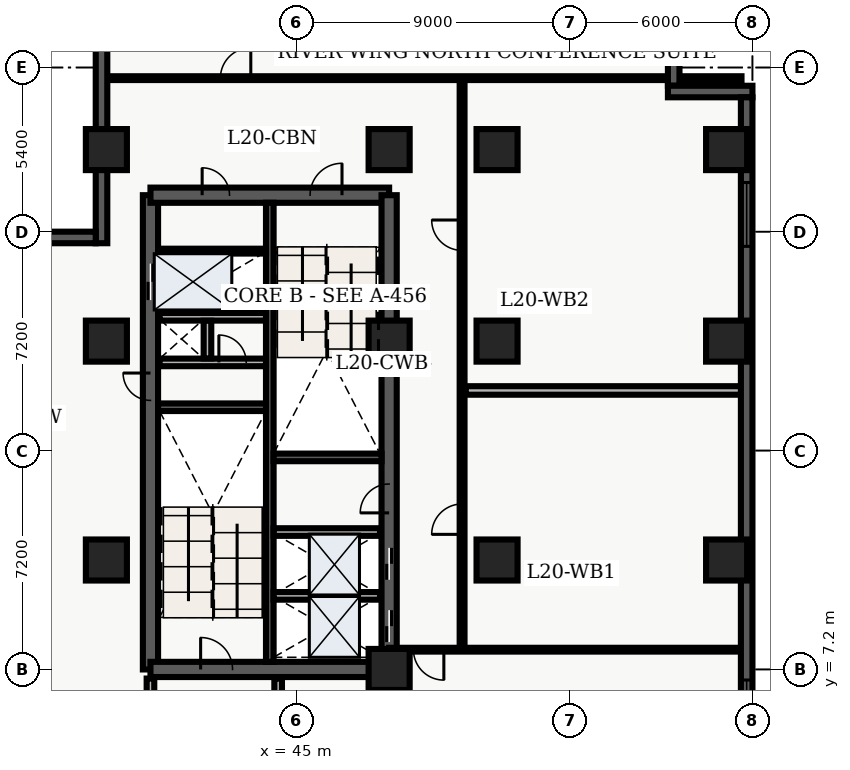
"""IFC4 building model, lengths in metres.
Left out: names, types, materials, properties, quantities, classifications, styles, units other than length and angle.
Written with IfcOpenShell. Run it as: python <this file> out.ifc"""

import sys

from ifc_helpers import new_model, entity, si_unit, converted_unit, direction, frame, origin_with_axes, origin_2d_with_axis, place, context, subcontext, project, spatial, polyline, rectangle, outline, extrude, element, fill, save


model = new_model("IFC4")
c1 = context("Model", 3, precision=1e-05, world=origin_with_axes(), true_north=direction((0.0, 1.0)))
c2 = subcontext(c1, "Body", "Model", "MODEL_VIEW")
j1 = project(units=[si_unit("LENGTHUNIT", "METRE"), converted_unit("PLANEANGLEUNIT", "DEGREE", entity("IfcPlaneAngleMeasure", 0.017), si_unit("PLANEANGLEUNIT", "RADIAN"), dimensions=[0, 0, 0, 0, 0, 0, 0])], contexts=[c1])
p1 = place(None, origin_with_axes())
s1 = spatial("IfcSite", under=j1, at=p1, CompositionType="ELEMENT")
p2 = place(p1, origin_with_axes())
s2 = spatial("IfcBuilding", under=s1, at=p2, CompositionType="ELEMENT")
p3 = place(p2, frame((0.0, 0.0, 84.6), z_axis=(0.0, 0.0, 1.0), x_axis=(1.0, 0.0, 0.0)))
s3 = spatial("IfcBuildingStorey", under=s2, at=p3, CompositionType="ELEMENT", Elevation=84.6)
p4 = place(p3, frame((40.2, 7.2, 0.0), z_axis=(0.0, 0.0, 1.0), x_axis=(0.0, 1.0, 0.0)))
e1 = element("IfcWall", 1, at=p4, inside=s3, PredefinedType="SHEAR", context=c2, shape_type="SweptSolid", body=[
    extrude(outline(polyline([(0.0, -0.25), (15.6, -0.25), (15.6, 0.25), (0.0, 0.25), (0.0, -0.25)])), origin_with_axes(), (0.0, 0.0, 1.0), 4.26),
])
p5 = place(p4, frame((12.75, 0.0, 0.0), z_axis=(0.0, 0.0, 1.0), x_axis=(1.0, 0.0, 0.0)))
e2 = element("IfcOpeningElement", 2, at=p5, cuts=e1, PredefinedType="OPENING", context=c2, shape_type="SweptSolid", body=[
    extrude(rectangle(XDim=1.2, YDim=0.52, at=origin_2d_with_axis()), origin_with_axes(), (0.0, 0.0, 1.0), 2.15),
])
p6 = place(p4, frame((9.3, 0.0, 0.0), z_axis=(0.0, 0.0, 1.0), x_axis=(1.0, 0.0, 0.0)))
e3 = element("IfcOpeningElement", 3, at=p6, cuts=e1, PredefinedType="OPENING", context=c2, shape_type="SweptSolid", body=[
    extrude(rectangle(XDim=0.9, YDim=0.52, at=origin_2d_with_axis()), origin_with_axes(), (0.0, 0.0, 1.0), 2.15),
])
p7 = place(p3, frame((40.2, 7.2, 0.0), z_axis=(0.0, 0.0, 1.0), x_axis=(1.0, 0.0, 0.0)))
e4 = element("IfcWall", 4, at=p7, inside=s3, PredefinedType="SHEAR", context=c2, shape_type="SweptSolid", body=[
    extrude(outline(polyline([(0.0, -0.25), (7.85, -0.25), (7.85, 0.25), (0.0, 0.25), (0.0, -0.25)])), origin_with_axes(), (0.0, 0.0, 1.0), 4.26),
])
p8 = place(p7, frame((2.175, 0.0, 0.0), z_axis=(0.0, 0.0, 1.0), x_axis=(1.0, 0.0, 0.0)))
e5 = element("IfcOpeningElement", 5, at=p8, cuts=e4, PredefinedType="OPENING", context=c2, shape_type="SweptSolid", body=[
    extrude(rectangle(XDim=1.05, YDim=0.52, at=origin_2d_with_axis()), origin_with_axes(), (0.0, 0.0, 1.0), 2.15),
])
p9 = place(p3, frame((40.2, 22.8, 0.0), z_axis=(0.0, 0.0, 1.0), x_axis=(1.0, 0.0, 0.0)))
e6 = element("IfcWall", 6, at=p9, inside=s3, PredefinedType="SHEAR", context=c2, shape_type="SweptSolid", body=[
    extrude(outline(polyline([(0.0, -0.25), (7.85, -0.25), (7.85, 0.25), (0.0, 0.25), (0.0, -0.25)])), origin_with_axes(), (0.0, 0.0, 1.0), 4.26),
])
p10 = place(p9, frame((5.775, 0.0, 0.0), z_axis=(0.0, 0.0, 1.0), x_axis=(1.0, 0.0, 0.0)))
e7 = element("IfcOpeningElement", 7, at=p10, cuts=e6, PredefinedType="OPENING", context=c2, shape_type="SweptSolid", body=[
    extrude(rectangle(XDim=1.05, YDim=0.52, at=origin_2d_with_axis()), origin_with_axes(), (0.0, 0.0, 1.0), 2.15),
])
p11 = place(p9, frame((2.15, 0.0, 0.0), z_axis=(0.0, 0.0, 1.0), x_axis=(1.0, 0.0, 0.0)))
e8 = element("IfcOpeningElement", 8, at=p11, cuts=e6, PredefinedType="OPENING", context=c2, shape_type="SweptSolid", body=[
    extrude(rectangle(XDim=0.9, YDim=0.52, at=origin_2d_with_axis()), origin_with_axes(), (0.0, 0.0, 1.0), 2.15),
])
p12 = place(p3, frame((48.05, 7.2, 0.0), z_axis=(0.0, 0.0, 1.0), x_axis=(0.0, 1.0, 0.0)))
e9 = element("IfcWall", 9, at=p12, inside=s3, PredefinedType="SHEAR", context=c2, shape_type="SweptSolid", body=[
    extrude(outline(polyline([(0.0, -0.25), (15.6, -0.25), (15.6, 0.25), (0.0, 0.25), (0.0, -0.25)])), origin_with_axes(), (0.0, 0.0, 1.0), 4.26),
])
p13 = place(p12, frame((1.425, 0.0, 0.0), z_axis=(0.0, 0.0, 1.0), x_axis=(1.0, 0.0, 0.0)))
e10 = element("IfcOpeningElement", 10, at=p13, cuts=e9, PredefinedType="OPENING", context=c2, shape_type="SweptSolid", body=[
    extrude(rectangle(XDim=1.05, YDim=0.52, at=origin_2d_with_axis()), origin_with_axes(), (0.0, 0.0, 1.0), 2.15),
])
p14 = place(p12, frame((3.475, 0.0, 0.0), z_axis=(0.0, 0.0, 1.0), x_axis=(1.0, 0.0, 0.0)))
e11 = element("IfcOpeningElement", 11, at=p14, cuts=e9, PredefinedType="OPENING", context=c2, shape_type="SweptSolid", body=[
    extrude(rectangle(XDim=1.05, YDim=0.52, at=origin_2d_with_axis()), origin_with_axes(), (0.0, 0.0, 1.0), 2.15),
])
p15 = place(p12, frame((5.625, 0.0, 0.0), z_axis=(0.0, 0.0, 1.0), x_axis=(1.0, 0.0, 0.0)))
e12 = element("IfcOpeningElement", 12, at=p15, cuts=e9, PredefinedType="OPENING", context=c2, shape_type="SweptSolid", body=[
    extrude(rectangle(XDim=0.95, YDim=0.52, at=origin_2d_with_axis()), origin_with_axes(), (0.0, 0.0, 1.0), 2.15),
])
p16 = place(p3, frame((44.125, 7.45, 0.0), z_axis=(0.0, 0.0, 1.0), x_axis=(0.0, 1.0, 0.0)))
e13 = element("IfcWall", 13, at=p16, inside=s3, PredefinedType="SHEAR", context=c2, shape_type="SweptSolid", body=[
    extrude(outline(polyline([(0.0, -0.125), (15.1, -0.125), (15.1, 0.125), (0.0, 0.125), (0.0, -0.125)])), origin_with_axes(), (0.0, 0.0, 1.0), 4.26),
])
for number, where, z_axis, x_axis in (
    (14, (40.45, 15.825, 0.0), (0.0, 0.0, 1.0), (1.0, 0.0, 0.0)),
    (15, (44.25, 14.175, 0.0), (0.0, 0.0, 1.0), (1.0, 0.0, 0.0)),
):
    element("IfcWall", number, at=place(p3, frame(where, z_axis=z_axis, x_axis=x_axis)), inside=s3, PredefinedType="SHEAR", context=c2, shape_type="SweptSolid", body=[
        extrude(outline(polyline([(0.0, -0.125), (3.55, -0.125), (3.55, 0.125), (0.0, 0.125), (0.0, -0.125)])), origin_with_axes(), (0.0, 0.0, 1.0), 4.26),
    ])
p17 = place(p3, frame((40.5, 17.3, 0.0), z_axis=(0.0, 0.0, 1.0), x_axis=(1.0, 0.0, 0.0)))
e16 = element("IfcWall", 16, at=p17, inside=s3, PredefinedType="SOLIDWALL", context=c2, shape_type="SweptSolid", body=[
    extrude(outline(polyline([(0.0, -0.125), (3.5, -0.125), (3.5, 0.125), (0.0, 0.125), (0.0, -0.125)])), origin_with_axes(), (0.0, 0.0, 1.0), 3.3),
])
p18 = place(p17, frame((2.4, 0.0, 0.0), z_axis=(0.0, 0.0, 1.0), x_axis=(1.0, 0.0, 0.0)))
e17 = element("IfcOpeningElement", 17, at=p18, cuts=e16, PredefinedType="OPENING", context=c2, shape_type="SweptSolid", body=[
    extrude(rectangle(XDim=0.9, YDim=0.27, at=origin_2d_with_axis()), origin_with_axes(), (0.0, 0.0, 1.0), 2.15),
])
p19 = place(p3, frame((40.5, 18.8, 0.0), z_axis=(0.0, 0.0, 1.0), x_axis=(1.0, 0.0, 0.0)))
e18 = element("IfcWall", 18, at=p19, inside=s3, PredefinedType="SOLIDWALL", context=c2, shape_type="SweptSolid", body=[
    extrude(outline(polyline([(0.0, -0.125), (3.5, -0.125), (3.5, 0.125), (0.0, 0.125), (0.0, -0.125)])), origin_with_axes(), (0.0, 0.0, 1.0), 3.3),
])
p20 = place(p3, frame((42.075, 17.43, 0.0), z_axis=(0.0, 0.0, 1.0), x_axis=(0.0, 1.0, 0.0)))
e19 = element("IfcWall", 19, at=p20, inside=s3, PredefinedType="SOLIDWALL", context=c2, shape_type="SweptSolid", body=[
    extrude(outline(polyline([(0.0, -0.125), (1.24, -0.125), (1.24, 0.125), (0.0, 0.125), (0.0, -0.125)])), origin_with_axes(), (0.0, 0.0, 1.0), 3.3),
])
p21 = place(p3, frame((40.2, 3.1, 0.0), z_axis=(0.0, 0.0, 1.0), x_axis=(0.0, 1.0, 0.0)))
e20 = element("IfcWall", 20, at=p21, inside=s3, PredefinedType="SOLIDWALL", context=c2, shape_type="SweptSolid", body=[
    extrude(outline(polyline([(0.0, -0.125), (3.8, -0.125), (3.8, 0.125), (0.0, 0.125), (0.0, -0.125)])), origin_with_axes(), (0.0, 0.0, 1.0), 3.3),
])
p22 = place(p21, frame((2.075, 0.0, 0.0), z_axis=(0.0, 0.0, 1.0), x_axis=(1.0, 0.0, 0.0)))
e21 = element("IfcOpeningElement", 21, at=p22, cuts=e20, PredefinedType="OPENING", context=c2, shape_type="SweptSolid", body=[
    extrude(rectangle(XDim=1.05, YDim=0.27, at=origin_2d_with_axis()), origin_with_axes(), (0.0, 0.0, 1.0), 2.15),
])
p23 = place(p3, frame((44.4, 3.1, 0.0), z_axis=(0.0, 0.0, 1.0), x_axis=(0.0, 1.0, 0.0)))
e22 = element("IfcWall", 22, at=p23, inside=s3, PredefinedType="SOLIDWALL", context=c2, shape_type="SweptSolid", body=[
    extrude(outline(polyline([(0.0, -0.125), (3.8, -0.125), (3.8, 0.125), (0.0, 0.125), (0.0, -0.125)])), origin_with_axes(), (0.0, 0.0, 1.0), 3.3),
])
for number, where, z_axis, x_axis in (
    (23, (38.75, 10.8, 0.0), (0.0, 0.0, 1.0), (1.0, 0.0, 0.0)),
    (24, (38.75, 18.0, 0.0), (0.0, 0.0, 1.0), (1.0, 0.0, 0.0)),
    (25, (38.75, 24.3, 0.0), (0.0, 0.0, 1.0), (1.0, 0.0, 0.0)),
    (26, (48.05, 7.2, 0.0), (0.0, 0.0, 1.0), (1.0, 0.0, 0.0)),
    (27, (48.05, 18.0, 0.0), (0.0, 0.0, 1.0), (1.0, 0.0, 0.0)),
    (28, (48.05, 24.3, 0.0), (0.0, 0.0, 1.0), (1.0, 0.0, 0.0)),
    (29, (51.6, 10.8, 0.0), (0.0, 0.0, 1.0), (1.0, 0.0, 0.0)),
    (30, (51.6, 18.0, 0.0), (0.0, 0.0, 1.0), (1.0, 0.0, 0.0)),
    (31, (51.6, 24.3, 0.0), (0.0, 0.0, 1.0), (1.0, 0.0, 0.0)),
    (32, (59.15, 10.8, 0.0), (0.0, 0.0, 1.0), (1.0, 0.0, 0.0)),
    (33, (59.15, 18.0, 0.0), (0.0, 0.0, 1.0), (1.0, 0.0, 0.0)),
    (34, (59.15, 24.3, 0.0), (0.0, 0.0, 1.0), (1.0, 0.0, 0.0)),
):
    element("IfcColumn", number, at=place(p3, frame(where, z_axis=z_axis, x_axis=x_axis)), inside=s3, PredefinedType="COLUMN", context=c2, shape_type="SweptSolid", body=[
        extrude(rectangle(XDim=1.35, YDim=1.35, at=origin_2d_with_axis()), origin_with_axes(), (0.0, 0.0, 1.0), 4.5),
    ])
p24 = place(p3, frame((40.5, 20.96, 0.0), z_axis=(0.0, 0.0, 1.0), x_axis=(1.0, 0.0, 0.0)))
e35 = element("IfcWall", 35, at=p24, inside=s3, PredefinedType="PARTITIONING", context=c2, shape_type="SweptSolid", body=[
    extrude(outline(polyline([(0.0, -0.08), (3.5, -0.08), (3.5, 0.08), (0.0, 0.08), (0.0, -0.08)])), origin_with_axes(), (0.0, 0.0, 1.0), 3.2),
])
for number, where, z_axis, x_axis in (
    (36, (44.25, 9.62, 0.0), (0.0, 0.0, 1.0), (1.0, 0.0, 0.0)),
    (37, (44.25, 11.72, 0.0), (0.0, 0.0, 1.0), (1.0, 0.0, 0.0)),
):
    element("IfcWall", number, at=place(p3, frame(where, z_axis=z_axis, x_axis=x_axis)), inside=s3, PredefinedType="SOLIDWALL", context=c2, shape_type="SweptSolid", body=[
        extrude(outline(polyline([(0.0, -0.125), (3.5, -0.125), (3.5, 0.125), (0.0, 0.125), (0.0, -0.125)])), origin_with_axes(), (0.0, 0.0, 1.0), 3.2),
    ])
p25 = place(p3, frame((50.45, 7.85, 0.0), z_axis=(0.0, 0.0, 1.0), x_axis=(0.0, 1.0, 0.0)))
e38 = element("IfcWall", 38, at=p25, inside=s3, PredefinedType="PARTITIONING", context=c2, shape_type="SweptSolid", body=[
    extrude(outline(polyline([(0.0, -0.08), (18.8, -0.08), (18.8, 0.08), (0.0, 0.08), (0.0, -0.08)])), origin_with_axes(), (0.0, 0.0, 1.0), 3.2),
])
p26 = place(p25, frame((4.293, 0.0, 0.0), z_axis=(0.0, 0.0, 1.0), x_axis=(1.0, 0.0, 0.0)))
e39 = element("IfcOpeningElement", 39, at=p26, cuts=e38, PredefinedType="OPENING", context=c2, shape_type="SweptSolid", body=[
    extrude(rectangle(XDim=1.0, YDim=0.18, at=origin_2d_with_axis()), origin_with_axes(), (0.0, 0.0, 1.0), 2.15),
])
p27 = place(p25, frame((13.633, 0.0, 0.0), z_axis=(0.0, 0.0, 1.0), x_axis=(1.0, 0.0, 0.0)))
e40 = element("IfcOpeningElement", 40, at=p27, cuts=e38, PredefinedType="OPENING", context=c2, shape_type="SweptSolid", body=[
    extrude(rectangle(XDim=1.0, YDim=0.18, at=origin_2d_with_axis()), origin_with_axes(), (0.0, 0.0, 1.0), 2.15),
])
p28 = place(p3, frame((59.64, 7.85, 0.0), z_axis=(0.0, 0.0, 1.0), x_axis=(-1.0, 0.0, 0.0)))
e41 = element("IfcWall", 41, at=p28, inside=s3, PredefinedType="PARTITIONING", context=c2, shape_type="SweptSolid", body=[
    extrude(outline(polyline([(0.0, -0.062), (11.59, -0.062), (11.59, 0.062), (0.0, 0.062), (0.0, -0.062)])), origin_with_axes(), (0.0, 0.0, 1.0), 3.2),
])
p29 = place(p28, frame((10.29, 0.0, 0.0), z_axis=(0.0, 0.0, 1.0), x_axis=(1.0, 0.0, 0.0)))
e42 = element("IfcOpeningElement", 42, at=p29, cuts=e41, PredefinedType="OPENING", context=c2, shape_type="SweptSolid", body=[
    extrude(rectangle(XDim=1.0, YDim=0.145, at=origin_2d_with_axis()), origin_with_axes(), (0.0, 0.0, 1.0), 2.15),
])
p30 = place(p3, frame((38.76, 26.65, 0.0), z_axis=(0.0, 0.0, 1.0), x_axis=(1.0, 0.0, 0.0)))
e43 = element("IfcWall", 43, at=p30, inside=s3, PredefinedType="PARTITIONING", context=c2, shape_type="SweptSolid", body=[
    extrude(outline(polyline([(0.0, -0.062), (20.88, -0.062), (20.88, 0.062), (0.0, 0.062), (0.0, -0.062)])), origin_with_axes(), (0.0, 0.0, 1.0), 3.2),
])
p31 = place(p30, frame((4.24, 0.0, 0.0), z_axis=(0.0, 0.0, 1.0), x_axis=(1.0, 0.0, 0.0)))
e44 = element("IfcOpeningElement", 44, at=p31, cuts=e43, PredefinedType="OPENING", context=c2, shape_type="SweptSolid", body=[
    extrude(rectangle(XDim=1.0, YDim=0.145, at=origin_2d_with_axis()), origin_with_axes(), (0.0, 0.0, 1.0), 2.15),
])
p32 = place(p3, frame((50.57, 16.377, 0.0), z_axis=(0.0, 0.0, 1.0), x_axis=(1.0, 0.0, 0.0)))
e45 = element("IfcWall", 45, at=p32, inside=s3, PredefinedType="PARTITIONING", context=c2, shape_type="SweptSolid", body=[
    extrude(outline(polyline([(0.0, -0.14), (9.055, -0.14), (9.055, 0.14), (0.0, 0.14), (0.0, -0.14)])), origin_with_axes(), (0.0, 0.0, 1.0), 3.2),
])
p33 = place(p3, frame((38.59, 21.22, 0.0), z_axis=(0.0, 0.0, 1.0), x_axis=(0.0, 1.0, 0.0)))
e46 = element("IfcWall", 46, at=p33, inside=s3, PredefinedType="SOLIDWALL", context=c2, shape_type="SweptSolid", body=[
    extrude(outline(polyline([(0.0, -0.19), (7.58, -0.19), (7.58, 0.19), (0.0, 0.19), (0.0, -0.19)])), origin_with_axes(), (0.0, 0.0, 1.0), 4.26),
])
p34 = place(p3, frame((57.41, 28.42, 0.0), z_axis=(0.0, 0.0, 1.0), x_axis=(0.0, -1.0, 0.0)))
e47 = element("IfcWall", 47, at=p34, inside=s3, PredefinedType="SOLIDWALL", context=c2, shape_type="SweptSolid", body=[
    extrude(outline(polyline([(0.0, -0.19), (2.02, -0.19), (2.02, 0.19), (0.0, 0.19), (0.0, -0.19)])), origin_with_axes(), (0.0, 0.0, 1.0), 4.26),
])
p35 = place(p3, frame((57.22, 26.21, 0.0), z_axis=(0.0, 0.0, 1.0), x_axis=(1.0, 0.0, 0.0)))
e48 = element("IfcWall", 48, at=p35, inside=s3, PredefinedType="SOLIDWALL", context=c2, shape_type="SweptSolid", body=[
    extrude(outline(polyline([(0.0, -0.19), (2.78, -0.19), (2.78, 0.19), (0.0, 0.19), (0.0, -0.19)])), origin_with_axes(), (0.0, 0.0, 1.0), 4.26),
])
p36 = place(p3, frame((59.81, 26.02, 0.0), z_axis=(0.0, 0.0, 1.0), x_axis=(0.0, -1.0, 0.0)))
e49 = element("IfcWall", 49, at=p36, inside=s3, PredefinedType="SOLIDWALL", context=c2, shape_type="SweptSolid", body=[
    extrude(outline(polyline([(0.0, -0.19), (23.62, -0.19), (23.62, 0.19), (0.0, 0.19), (0.0, -0.19)])), origin_with_axes(), (0.0, 0.0, 1.0), 4.26),
])
p37 = place(p36, frame((3.853, 0.0, 0.45), z_axis=(0.0, 0.0, 1.0), x_axis=(1.0, 0.0, 0.0)))
e50 = element("IfcOpeningElement", 50, at=p37, cuts=e49, PredefinedType="OPENING", context=c2, shape_type="SweptSolid", body=[
    extrude(rectangle(XDim=2.1, YDim=0.4, at=origin_2d_with_axis()), origin_with_axes(), (0.0, 0.0, 1.0), 2.2),
])
p38 = place(p36, frame((20.218, 0.0, 0.45), z_axis=(0.0, 0.0, 1.0), x_axis=(1.0, 0.0, 0.0)))
e51 = element("IfcOpeningElement", 51, at=p38, cuts=e49, PredefinedType="OPENING", context=c2, shape_type="SweptSolid", body=[
    extrude(rectangle(XDim=2.1, YDim=0.4, at=origin_2d_with_axis()), origin_with_axes(), (0.0, 0.0, 1.0), 2.2),
])
p39 = place(p3, frame((21.22, 21.41, 0.0), z_axis=(0.0, 0.0, 1.0), x_axis=(1.0, 0.0, 0.0)))
e52 = element("IfcWall", 52, at=p39, inside=s3, PredefinedType="SOLIDWALL", context=c2, shape_type="SweptSolid", body=[
    extrude(outline(polyline([(0.0, -0.19), (17.18, -0.19), (17.18, 0.19), (0.0, 0.19), (0.0, -0.19)])), origin_with_axes(), (0.0, 0.0, 1.0), 4.26),
])
p40 = place(p39, frame((3.263, 0.0, 0.45), z_axis=(0.0, 0.0, 1.0), x_axis=(1.0, 0.0, 0.0)))
e53 = element("IfcOpeningElement", 53, at=p40, cuts=e52, PredefinedType="OPENING", context=c2, shape_type="SweptSolid", body=[
    extrude(rectangle(XDim=2.1, YDim=0.4, at=origin_2d_with_axis()), origin_with_axes(), (0.0, 0.0, 1.0), 2.2),
])
p41 = place(p39, frame((8.59, 0.0, 0.45), z_axis=(0.0, 0.0, 1.0), x_axis=(1.0, 0.0, 0.0)))
e54 = element("IfcOpeningElement", 54, at=p41, cuts=e52, PredefinedType="OPENING", context=c2, shape_type="SweptSolid", body=[
    extrude(rectangle(XDim=2.1, YDim=0.4, at=origin_2d_with_axis()), origin_with_axes(), (0.0, 0.0, 1.0), 2.2),
])
p42 = place(p39, frame((13.467, 0.0, 0.45), z_axis=(0.0, 0.0, 1.0), x_axis=(1.0, 0.0, 0.0)))
e55 = element("IfcOpeningElement", 55, at=p42, cuts=e52, PredefinedType="OPENING", context=c2, shape_type="SweptSolid", body=[
    extrude(rectangle(XDim=2.1, YDim=0.4, at=origin_2d_with_axis()), origin_with_axes(), (0.0, 0.0, 1.0), 2.2),
])
p43 = place(p12, frame((1.425, 0.0, 0.0), z_axis=(0.0, 0.0, 1.0), x_axis=(1.0, 0.0, 0.0)))
e56 = element("IfcDoor", 56, at=p43, inside=s3, OperationType="SLIDING_TO_LEFT", PredefinedType="DOOR", context=c2, shape_type="SweptSolid", body=[
    extrude(rectangle(XDim=1.05, YDim=0.09, at=origin_2d_with_axis()), origin_with_axes(), (0.0, 0.0, 1.0), 2.15),
])
fill(e10, e56)
p44 = place(p12, frame((3.475, 0.0, 0.0), z_axis=(0.0, 0.0, 1.0), x_axis=(1.0, 0.0, 0.0)))
e57 = element("IfcDoor", 57, at=p44, inside=s3, OperationType="SLIDING_TO_RIGHT", PredefinedType="DOOR", context=c2, shape_type="SweptSolid", body=[
    extrude(rectangle(XDim=1.05, YDim=0.09, at=origin_2d_with_axis()), origin_with_axes(), (0.0, 0.0, 1.0), 2.15),
])
fill(e11, e57)
p45 = place(p4, frame((12.75, 0.0, 0.0), z_axis=(0.0, 0.0, 1.0), x_axis=(1.0, 0.0, 0.0)))
e58 = element("IfcDoor", 58, at=p45, inside=s3, OperationType="DOUBLE_DOOR_SLIDING", PredefinedType="DOOR", context=c2, shape_type="SweptSolid", body=[
    extrude(rectangle(XDim=1.2, YDim=0.09, at=origin_2d_with_axis()), origin_with_axes(), (0.0, 0.0, 1.0), 2.15),
])
fill(e2, e58)
p46 = place(p4, frame((9.3, 0.0, 0.0), z_axis=(0.0, 0.0, 1.0), x_axis=(1.0, 0.0, 0.0)))
e59 = element("IfcDoor", 59, at=p46, inside=s3, OperationType="SINGLE_SWING_RIGHT", PredefinedType="DOOR", context=c2, shape_type="SweptSolid", body=[
    extrude(rectangle(XDim=0.9, YDim=0.09, at=origin_2d_with_axis()), origin_with_axes(), (0.0, 0.0, 1.0), 2.15),
])
fill(e3, e59)
p47 = place(p17, frame((2.4, 0.0, 0.0), z_axis=(0.0, 0.0, 1.0), x_axis=(1.0, 0.0, 0.0)))
e60 = element("IfcDoor", 60, at=p47, inside=s3, OperationType="SINGLE_SWING_LEFT", PredefinedType="DOOR", context=c2, shape_type="SweptSolid", body=[
    extrude(rectangle(XDim=0.9, YDim=0.09, at=origin_2d_with_axis()), origin_with_axes(), (0.0, 0.0, 1.0), 2.15),
])
fill(e17, e60)
p48 = place(p7, frame((2.175, 0.0, 0.0), z_axis=(0.0, 0.0, 1.0), x_axis=(1.0, 0.0, 0.0)))
e61 = element("IfcDoor", 61, at=p48, inside=s3, OperationType="SINGLE_SWING_LEFT", PredefinedType="DOOR", context=c2, shape_type="SweptSolid", body=[
    extrude(rectangle(XDim=1.05, YDim=0.09, at=origin_2d_with_axis()), origin_with_axes(), (0.0, 0.0, 1.0), 2.15),
])
fill(e5, e61)
p49 = place(p9, frame((5.775, 0.0, 0.0), z_axis=(0.0, 0.0, 1.0), x_axis=(1.0, 0.0, 0.0)))
e62 = element("IfcDoor", 62, at=p49, inside=s3, OperationType="SINGLE_SWING_RIGHT", PredefinedType="DOOR", context=c2, shape_type="SweptSolid", body=[
    extrude(rectangle(XDim=1.05, YDim=0.09, at=origin_2d_with_axis()), origin_with_axes(), (0.0, 0.0, 1.0), 2.15),
])
fill(e7, e62)
p50 = place(p9, frame((2.15, 0.0, 0.0), z_axis=(0.0, 0.0, 1.0), x_axis=(1.0, 0.0, 0.0)))
e63 = element("IfcDoor", 63, at=p50, inside=s3, OperationType="SINGLE_SWING_LEFT", PredefinedType="DOOR", context=c2, shape_type="SweptSolid", body=[
    extrude(rectangle(XDim=0.9, YDim=0.09, at=origin_2d_with_axis()), origin_with_axes(), (0.0, 0.0, 1.0), 2.15),
])
fill(e8, e63)
p51 = place(p12, frame((5.625, 0.0, 0.0), z_axis=(0.0, 0.0, 1.0), x_axis=(1.0, 0.0, 0.0)))
e64 = element("IfcDoor", 64, at=p51, inside=s3, OperationType="SINGLE_SWING_LEFT", PredefinedType="DOOR", context=c2, shape_type="SweptSolid", body=[
    extrude(rectangle(XDim=0.95, YDim=0.09, at=origin_2d_with_axis()), origin_with_axes(), (0.0, 0.0, 1.0), 2.15),
])
fill(e12, e64)
p52 = place(p28, frame((10.29, 0.0, 0.0), z_axis=(0.0, 0.0, 1.0), x_axis=(1.0, 0.0, 0.0)))
e65 = element("IfcDoor", 65, at=p52, inside=s3, OperationType="SINGLE_SWING_LEFT", PredefinedType="DOOR", context=c2, shape_type="SweptSolid", body=[
    extrude(rectangle(XDim=1.0, YDim=0.075, at=origin_2d_with_axis()), origin_with_axes(), (0.0, 0.0, 1.0), 2.15),
])
fill(e42, e65)
p53 = place(p30, frame((4.24, 0.0, 0.0), z_axis=(0.0, 0.0, 1.0), x_axis=(1.0, 0.0, 0.0)))
e66 = element("IfcDoor", 66, at=p53, inside=s3, OperationType="SINGLE_SWING_RIGHT", PredefinedType="DOOR", context=c2, shape_type="SweptSolid", body=[
    extrude(rectangle(XDim=1.0, YDim=0.075, at=origin_2d_with_axis()), origin_with_axes(), (0.0, 0.0, 1.0), 2.15),
])
fill(e44, e66)
p54 = place(p25, frame((4.293, 0.0, 0.0), z_axis=(0.0, 0.0, 1.0), x_axis=(1.0, 0.0, 0.0)))
e67 = element("IfcDoor", 67, at=p54, inside=s3, OperationType="SINGLE_SWING_LEFT", PredefinedType="DOOR", context=c2, shape_type="SweptSolid", body=[
    extrude(rectangle(XDim=1.0, YDim=0.09, at=origin_2d_with_axis()), origin_with_axes(), (0.0, 0.0, 1.0), 2.15),
])
fill(e39, e67)
p55 = place(p25, frame((13.633, 0.0, 0.0), z_axis=(0.0, 0.0, 1.0), x_axis=(1.0, 0.0, 0.0)))
e68 = element("IfcDoor", 68, at=p55, inside=s3, OperationType="SINGLE_SWING_RIGHT", PredefinedType="DOOR", context=c2, shape_type="SweptSolid", body=[
    extrude(rectangle(XDim=1.0, YDim=0.09, at=origin_2d_with_axis()), origin_with_axes(), (0.0, 0.0, 1.0), 2.15),
])
fill(e40, e68)
p56 = place(p36, frame((3.853, 0.0, 0.45), z_axis=(0.0, 0.0, 1.0), x_axis=(1.0, 0.0, 0.0)))
e69 = element("IfcWindow", 69, at=p56, inside=s3, PredefinedType="WINDOW", context=c2, shape_type="SweptSolid", body=[
    extrude(rectangle(XDim=2.1, YDim=0.09, at=origin_2d_with_axis()), origin_with_axes(), (0.0, 0.0, 1.0), 2.2),
])
fill(e50, e69)
p57 = place(p36, frame((20.218, 0.0, 0.45), z_axis=(0.0, 0.0, 1.0), x_axis=(1.0, 0.0, 0.0)))
e70 = element("IfcWindow", 70, at=p57, inside=s3, PredefinedType="WINDOW", context=c2, shape_type="SweptSolid", body=[
    extrude(rectangle(XDim=2.1, YDim=0.09, at=origin_2d_with_axis()), origin_with_axes(), (0.0, 0.0, 1.0), 2.2),
])
fill(e51, e70)
save(model, sys.argv[1])
